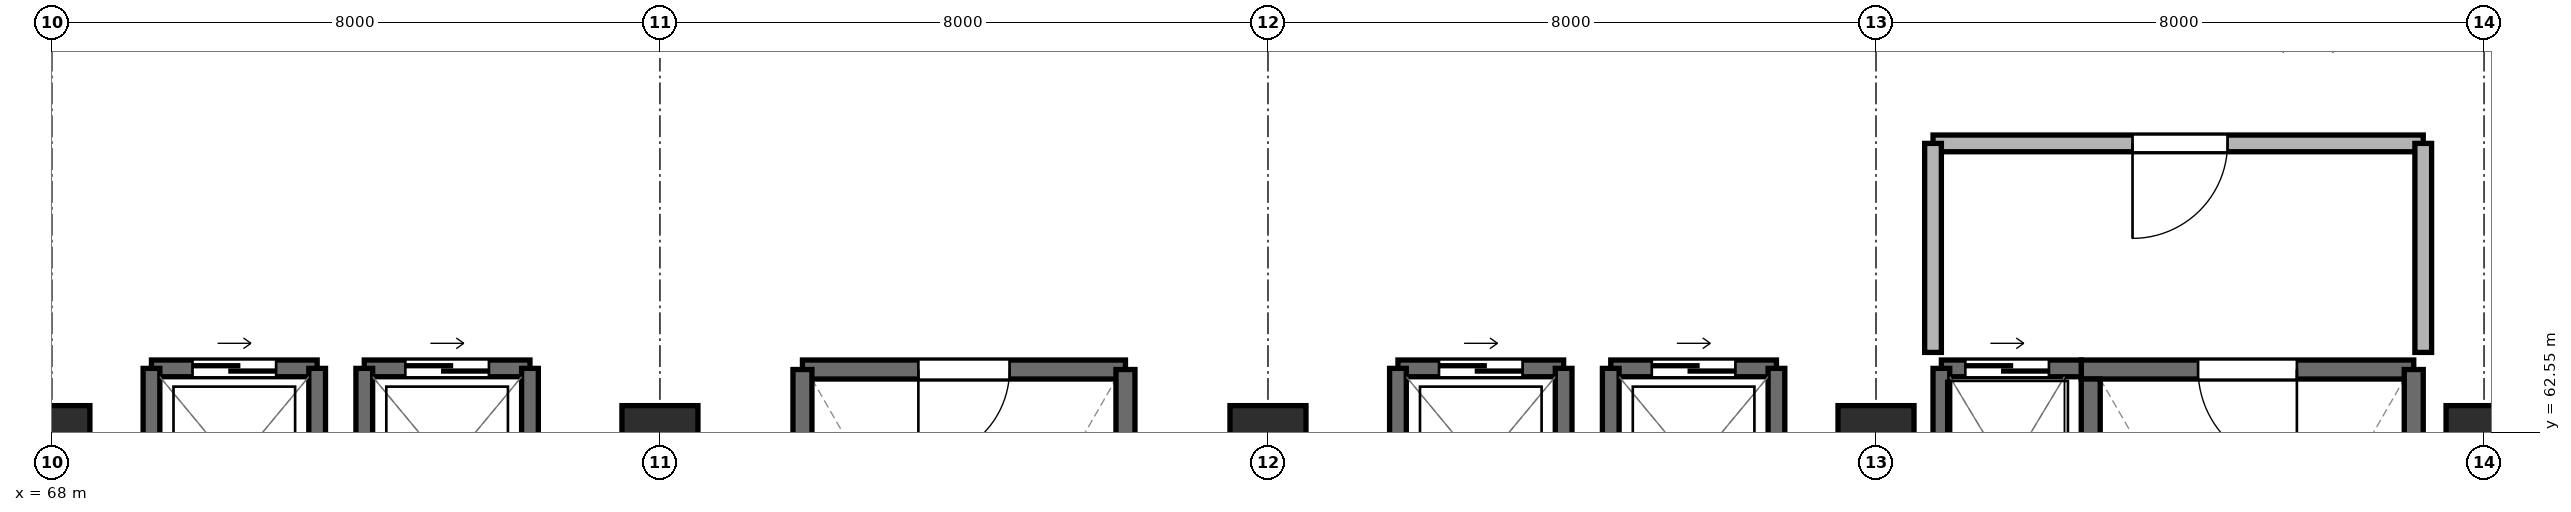
"""IFC4 building model, lengths in metres.
Left out: names, types, materials, properties, quantities, classifications, styles, units other than length and angle.
Written with IfcOpenShell. Run it as: python <this file> out.ifc"""

import sys

from ifc_helpers import new_model, si_unit, direction, frame, frame_2d, origin, origin_2d, place, context, subcontext, project, spatial, rectangle, extrude, element, fill, save


model = new_model("IFC4")
c1 = context("Model", 3, precision=1e-05, world=origin(), true_north=direction((0.0, 1.0)))
c2 = subcontext(c1, "Body", "Model", "MODEL_VIEW")
j1 = project(units=[si_unit("LENGTHUNIT", "METRE"), si_unit("PLANEANGLEUNIT", "RADIAN")], contexts=[c1])
p1 = place(None, origin())
s1 = spatial("IfcSite", under=j1, at=p1, CompositionType="ELEMENT")
p2 = place(p1, origin())
s2 = spatial("IfcBuilding", under=s1, at=p2, CompositionType="ELEMENT")
p3 = place(p2, frame((0.0, 0.0, 9.4)))
s3 = spatial("IfcBuildingStorey", under=s2, at=p3, CompositionType="ELEMENT", Elevation=9.4)
for number, where, z_axis, x_axis in (
    (1, (68.0, 62.4, -0.45), (0.0, 0.0, 1.0), (1.0, 0.0, 0.0)),
    (2, (76.0, 62.4, -0.45), (0.0, 0.0, 1.0), (1.0, 0.0, 0.0)),
    (3, (84.0, 62.4, -0.45), (0.0, 0.0, 1.0), (1.0, 0.0, 0.0)),
    (4, (92.0, 62.4, -0.45), (0.0, 0.0, 1.0), (1.0, 0.0, 0.0)),
    (5, (100.0, 62.4, -0.45), (0.0, 0.0, 1.0), (1.0, 0.0, 0.0)),
):
    element("IfcColumn", number, at=place(p3, frame(where, z_axis=z_axis, x_axis=x_axis)), inside=s3, PredefinedType="COLUMN", context=c2, shape_type="SweptSolid", body=[
        extrude(rectangle(XDim=1.0, YDim=1.0, at=origin_2d()), origin(), (0.0, 0.0, 1.0), 4.77),
    ])
p4 = place(p3, frame((99.075, 63.375, 0.0), z_axis=(0.0, 0.0, 1.0), x_axis=(-1.0, 0.0, 0.0)))
e6 = element("IfcWall", 6, at=p4, inside=s3, PredefinedType="SHEAR", context=c2, shape_type="SweptSolid", body=[
    extrude(rectangle(XDim=4.375, YDim=0.25, at=frame_2d((2.188, 0.0))), origin(), (0.0, 0.0, 1.0), 4.32),
])
p5 = place(p4, frame((1.538, 0.0, 0.0)))
e7 = element("IfcOpeningElement", 7, at=p5, cuts=e6, PredefinedType="OPENING", context=c2, shape_type="SweptSolid", body=[
    extrude(rectangle(XDim=1.3, YDim=2.2, at=frame_2d((0.65, 1.1))), frame((0.0, 0.137, 0.0), z_axis=(0.0, -1.0, 0.0), x_axis=(1.0, 0.0, 0.0)), (0.0, 0.0, 1.0), 0.274),
])
p6 = place(p3, frame((94.825, 63.25, 0.0), z_axis=(0.0, 0.0, 1.0), x_axis=(0.0, -1.0, 0.0)))
e8 = element("IfcWall", 8, at=p6, inside=s3, PredefinedType="SHEAR", context=c2, shape_type="SweptSolid", body=[
    extrude(rectangle(XDim=7.075, YDim=0.25, at=frame_2d((3.538, 0.0))), origin(), (0.0, 0.0, 1.0), 4.32),
])
p7 = place(p3, frame((99.075, 56.175, 0.0), z_axis=(0.0, 0.0, 1.0), x_axis=(0.0, 1.0, 0.0)))
e9 = element("IfcWall", 9, at=p7, inside=s3, PredefinedType="SHEAR", context=c2, shape_type="SweptSolid", body=[
    extrude(rectangle(XDim=7.2, YDim=0.25, at=frame_2d((3.6, 0.0))), origin(), (0.0, 0.0, 1.0), 4.32),
])
p8 = place(p3, frame((82.125, 63.375, 0.0), z_axis=(0.0, 0.0, 1.0), x_axis=(-1.0, 0.0, 0.0)))
e10 = element("IfcWall", 10, at=p8, inside=s3, PredefinedType="SHEAR", context=c2, shape_type="SweptSolid", body=[
    extrude(rectangle(XDim=4.25, YDim=0.25, at=frame_2d((2.125, 0.0))), origin(), (0.0, 0.0, 1.0), 4.32),
])
p9 = place(p8, frame((1.525, 0.0, 0.0)))
e11 = element("IfcOpeningElement", 11, at=p9, cuts=e10, PredefinedType="OPENING", context=c2, shape_type="SweptSolid", body=[
    extrude(rectangle(XDim=1.2, YDim=2.2, at=frame_2d((0.6, 1.1))), frame((0.0, 0.137, 0.0), z_axis=(0.0, -1.0, 0.0), x_axis=(1.0, 0.0, 0.0)), (0.0, 0.0, 1.0), 0.274),
])
for number, where, z_axis, x_axis in (
    (12, (77.875, 63.375, 0.0), (0.0, 0.0, 1.0), (0.0, -1.0, 0.0)),
    (13, (82.125, 56.175, 0.0), (0.0, 0.0, 1.0), (0.0, 1.0, 0.0)),
):
    element("IfcWall", number, at=place(p3, frame(where, z_axis=z_axis, x_axis=x_axis)), inside=s3, PredefinedType="SHEAR", context=c2, shape_type="SweptSolid", body=[
        extrude(rectangle(XDim=7.2, YDim=0.25, at=frame_2d((3.6, 0.0))), origin(), (0.0, 0.0, 1.0), 4.32),
    ])
p10 = place(p3, frame((94.7, 63.39, 0.0), z_axis=(0.0, 0.0, 1.0), x_axis=(-1.0, 0.0, 0.0)))
e14 = element("IfcWall", 14, at=p10, inside=s3, PredefinedType="SHEAR", context=c2, shape_type="SweptSolid", body=[
    extrude(rectangle(XDim=1.84, YDim=0.22, at=frame_2d((0.92, 0.0))), origin(), (0.0, 0.0, 1.0), 4.32),
])
p11 = place(p10, frame((0.425, 0.0, 0.0)))
e15 = element("IfcOpeningElement", 15, at=p11, cuts=e14, PredefinedType="OPENING", context=c2, shape_type="SweptSolid", body=[
    extrude(rectangle(XDim=1.1, YDim=2.2, at=frame_2d((0.55, 1.1))), frame((0.0, 0.122, 0.0), z_axis=(0.0, -1.0, 0.0), x_axis=(1.0, 0.0, 0.0)), (0.0, 0.0, 1.0), 0.244),
])
p12 = place(p3, frame((92.86, 63.39, 0.0), z_axis=(0.0, 0.0, 1.0), x_axis=(0.0, -1.0, 0.0)))
e16 = element("IfcWall", 16, at=p12, inside=s3, PredefinedType="SHEAR", context=c2, shape_type="SweptSolid", body=[
    extrude(rectangle(XDim=2.73, YDim=0.22, at=frame_2d((1.365, 0.0))), origin(), (0.0, 0.0, 1.0), 4.32),
])
p13 = place(p3, frame((71.49, 63.39, 0.0), z_axis=(0.0, 0.0, 1.0), x_axis=(-1.0, 0.0, 0.0)))
e17 = element("IfcWall", 17, at=p13, inside=s3, PredefinedType="SHEAR", context=c2, shape_type="SweptSolid", body=[
    extrude(rectangle(XDim=2.18, YDim=0.22, at=frame_2d((1.09, 0.0))), origin(), (0.0, 0.0, 1.0), 4.32),
])
p14 = place(p13, frame((0.54, 0.0, 0.0)))
e18 = element("IfcOpeningElement", 18, at=p14, cuts=e17, PredefinedType="OPENING", context=c2, shape_type="SweptSolid", body=[
    extrude(rectangle(XDim=1.1, YDim=2.2, at=frame_2d((0.55, 1.1))), frame((0.0, 0.122, 0.0), z_axis=(0.0, -1.0, 0.0), x_axis=(1.0, 0.0, 0.0)), (0.0, 0.0, 1.0), 0.244),
])
for number, where, z_axis, x_axis in (
    (19, (69.31, 63.39, 0.0), (0.0, 0.0, 1.0), (0.0, -1.0, 0.0)),
    (20, (71.49, 60.81, 0.0), (0.0, 0.0, 1.0), (0.0, 1.0, 0.0)),
):
    element("IfcWall", number, at=place(p3, frame(where, z_axis=z_axis, x_axis=x_axis)), inside=s3, PredefinedType="SHEAR", context=c2, shape_type="SweptSolid", body=[
        extrude(rectangle(XDim=2.58, YDim=0.22, at=frame_2d((1.29, 0.0))), origin(), (0.0, 0.0, 1.0), 4.32),
    ])
p15 = place(p3, frame((74.29, 63.39, 0.0), z_axis=(0.0, 0.0, 1.0), x_axis=(-1.0, 0.0, 0.0)))
e21 = element("IfcWall", 21, at=p15, inside=s3, PredefinedType="SHEAR", context=c2, shape_type="SweptSolid", body=[
    extrude(rectangle(XDim=2.18, YDim=0.22, at=frame_2d((1.09, 0.0))), origin(), (0.0, 0.0, 1.0), 4.32),
])
p16 = place(p15, frame((0.54, 0.0, 0.0)))
e22 = element("IfcOpeningElement", 22, at=p16, cuts=e21, PredefinedType="OPENING", context=c2, shape_type="SweptSolid", body=[
    extrude(rectangle(XDim=1.1, YDim=2.2, at=frame_2d((0.55, 1.1))), frame((0.0, 0.122, 0.0), z_axis=(0.0, -1.0, 0.0), x_axis=(1.0, 0.0, 0.0)), (0.0, 0.0, 1.0), 0.244),
])
for number, where, z_axis, x_axis in (
    (23, (72.11, 63.39, 0.0), (0.0, 0.0, 1.0), (0.0, -1.0, 0.0)),
    (24, (74.29, 60.81, 0.0), (0.0, 0.0, 1.0), (0.0, 1.0, 0.0)),
):
    element("IfcWall", number, at=place(p3, frame(where, z_axis=z_axis, x_axis=x_axis)), inside=s3, PredefinedType="SHEAR", context=c2, shape_type="SweptSolid", body=[
        extrude(rectangle(XDim=2.58, YDim=0.22, at=frame_2d((1.29, 0.0))), origin(), (0.0, 0.0, 1.0), 4.32),
    ])
p17 = place(p3, frame((87.89, 63.39, 0.0), z_axis=(0.0, 0.0, 1.0), x_axis=(-1.0, 0.0, 0.0)))
e25 = element("IfcWall", 25, at=p17, inside=s3, PredefinedType="SHEAR", context=c2, shape_type="SweptSolid", body=[
    extrude(rectangle(XDim=2.18, YDim=0.22, at=frame_2d((1.09, 0.0))), origin(), (0.0, 0.0, 1.0), 4.32),
])
p18 = place(p17, frame((0.54, 0.0, 0.0)))
e26 = element("IfcOpeningElement", 26, at=p18, cuts=e25, PredefinedType="OPENING", context=c2, shape_type="SweptSolid", body=[
    extrude(rectangle(XDim=1.1, YDim=2.2, at=frame_2d((0.55, 1.1))), frame((0.0, 0.122, 0.0), z_axis=(0.0, -1.0, 0.0), x_axis=(1.0, 0.0, 0.0)), (0.0, 0.0, 1.0), 0.244),
])
for number, where, z_axis, x_axis in (
    (27, (85.71, 63.39, 0.0), (0.0, 0.0, 1.0), (0.0, -1.0, 0.0)),
    (28, (87.89, 60.81, 0.0), (0.0, 0.0, 1.0), (0.0, 1.0, 0.0)),
):
    element("IfcWall", number, at=place(p3, frame(where, z_axis=z_axis, x_axis=x_axis)), inside=s3, PredefinedType="SHEAR", context=c2, shape_type="SweptSolid", body=[
        extrude(rectangle(XDim=2.58, YDim=0.22, at=frame_2d((1.29, 0.0))), origin(), (0.0, 0.0, 1.0), 4.32),
    ])
p19 = place(p3, frame((90.69, 63.39, 0.0), z_axis=(0.0, 0.0, 1.0), x_axis=(-1.0, 0.0, 0.0)))
e29 = element("IfcWall", 29, at=p19, inside=s3, PredefinedType="SHEAR", context=c2, shape_type="SweptSolid", body=[
    extrude(rectangle(XDim=2.18, YDim=0.22, at=frame_2d((1.09, 0.0))), origin(), (0.0, 0.0, 1.0), 4.32),
])
p20 = place(p19, frame((0.54, 0.0, 0.0)))
e30 = element("IfcOpeningElement", 30, at=p20, cuts=e29, PredefinedType="OPENING", context=c2, shape_type="SweptSolid", body=[
    extrude(rectangle(XDim=1.1, YDim=2.2, at=frame_2d((0.55, 1.1))), frame((0.0, 0.122, 0.0), z_axis=(0.0, -1.0, 0.0), x_axis=(1.0, 0.0, 0.0)), (0.0, 0.0, 1.0), 0.244),
])
for number, where, z_axis, x_axis in (
    (31, (88.51, 63.39, 0.0), (0.0, 0.0, 1.0), (0.0, -1.0, 0.0)),
    (32, (90.69, 60.81, 0.0), (0.0, 0.0, 1.0), (0.0, 1.0, 0.0)),
):
    element("IfcWall", number, at=place(p3, frame(where, z_axis=z_axis, x_axis=x_axis)), inside=s3, PredefinedType="SHEAR", context=c2, shape_type="SweptSolid", body=[
        extrude(rectangle(XDim=2.58, YDim=0.22, at=frame_2d((1.29, 0.0))), origin(), (0.0, 0.0, 1.0), 4.32),
    ])
p21 = place(p3, frame((92.75, 66.35, 0.0), z_axis=(0.0, 0.0, 1.0), x_axis=(1.0, 0.0, 0.0)))
e33 = element("IfcWall", 33, at=p21, inside=s3, PredefinedType="PARTITIONING", context=c2, shape_type="SweptSolid", body=[
    extrude(rectangle(XDim=6.45, YDim=0.22, at=frame_2d((3.225, 0.0))), origin(), (0.0, 0.0, 1.0), 3.88),
])
p22 = place(p21, frame((2.625, 0.0, 0.0)))
e34 = element("IfcOpeningElement", 34, at=p22, cuts=e33, PredefinedType="OPENING", context=c2, shape_type="SweptSolid", body=[
    extrude(rectangle(XDim=1.25, YDim=2.2, at=frame_2d((0.625, 1.1))), frame((0.0, 0.122, 0.0), z_axis=(0.0, -1.0, 0.0), x_axis=(1.0, 0.0, 0.0)), (0.0, 0.0, 1.0), 0.244),
])
for number, where, z_axis, x_axis in (
    (35, (92.75, 63.6, 0.0), (0.0, 0.0, 1.0), (0.0, 1.0, 0.0)),
    (36, (99.2, 63.6, 0.0), (0.0, 0.0, 1.0), (0.0, 1.0, 0.0)),
):
    element("IfcWall", number, at=place(p3, frame(where, z_axis=z_axis, x_axis=x_axis)), inside=s3, PredefinedType="PARTITIONING", context=c2, shape_type="SweptSolid", body=[
        extrude(rectangle(XDim=2.75, YDim=0.22, at=frame_2d((1.375, 0.0))), origin(), (0.0, 0.0, 1.0), 3.88),
    ])
p23 = place(p5, origin())
e37 = element("IfcDoor", 37, at=p23, inside=s3, OperationType="SINGLE_SWING_LEFT", PredefinedType="DOOR", context=c2, shape_type="SweptSolid", body=[
    extrude(rectangle(XDim=1.3, YDim=2.2, at=frame_2d((0.65, 1.1))), frame((0.0, 0.025, 0.0), z_axis=(0.0, -1.0, 0.0), x_axis=(1.0, 0.0, 0.0)), (0.0, 0.0, 1.0), 0.05),
])
fill(e7, e37)
p24 = place(p9, origin())
e38 = element("IfcDoor", 38, at=p24, inside=s3, OperationType="SINGLE_SWING_RIGHT", PredefinedType="DOOR", context=c2, shape_type="SweptSolid", body=[
    extrude(rectangle(XDim=1.2, YDim=2.2, at=frame_2d((0.6, 1.1))), frame((0.0, 0.025, 0.0), z_axis=(0.0, -1.0, 0.0), x_axis=(1.0, 0.0, 0.0)), (0.0, 0.0, 1.0), 0.05),
])
fill(e11, e38)
p25 = place(p11, origin())
e39 = element("IfcDoor", 39, at=p25, inside=s3, OperationType="SLIDING_TO_LEFT", PredefinedType="DOOR", context=c2, shape_type="SweptSolid", body=[
    extrude(rectangle(XDim=1.1, YDim=2.2, at=frame_2d((0.55, 1.1))), frame((0.0, 0.025, 0.0), z_axis=(0.0, -1.0, 0.0), x_axis=(1.0, 0.0, 0.0)), (0.0, 0.0, 1.0), 0.05),
])
fill(e15, e39)
p26 = place(p14, origin())
e40 = element("IfcDoor", 40, at=p26, inside=s3, OperationType="SLIDING_TO_LEFT", PredefinedType="DOOR", context=c2, shape_type="SweptSolid", body=[
    extrude(rectangle(XDim=1.1, YDim=2.2, at=frame_2d((0.55, 1.1))), frame((0.0, 0.025, 0.0), z_axis=(0.0, -1.0, 0.0), x_axis=(1.0, 0.0, 0.0)), (0.0, 0.0, 1.0), 0.05),
])
fill(e18, e40)
p27 = place(p16, origin())
e41 = element("IfcDoor", 41, at=p27, inside=s3, OperationType="SLIDING_TO_LEFT", PredefinedType="DOOR", context=c2, shape_type="SweptSolid", body=[
    extrude(rectangle(XDim=1.1, YDim=2.2, at=frame_2d((0.55, 1.1))), frame((0.0, 0.025, 0.0), z_axis=(0.0, -1.0, 0.0), x_axis=(1.0, 0.0, 0.0)), (0.0, 0.0, 1.0), 0.05),
])
fill(e22, e41)
p28 = place(p18, origin())
e42 = element("IfcDoor", 42, at=p28, inside=s3, OperationType="SLIDING_TO_LEFT", PredefinedType="DOOR", context=c2, shape_type="SweptSolid", body=[
    extrude(rectangle(XDim=1.1, YDim=2.2, at=frame_2d((0.55, 1.1))), frame((0.0, 0.025, 0.0), z_axis=(0.0, -1.0, 0.0), x_axis=(1.0, 0.0, 0.0)), (0.0, 0.0, 1.0), 0.05),
])
fill(e26, e42)
p29 = place(p20, origin())
e43 = element("IfcDoor", 43, at=p29, inside=s3, OperationType="SLIDING_TO_LEFT", PredefinedType="DOOR", context=c2, shape_type="SweptSolid", body=[
    extrude(rectangle(XDim=1.1, YDim=2.2, at=frame_2d((0.55, 1.1))), frame((0.0, 0.025, 0.0), z_axis=(0.0, -1.0, 0.0), x_axis=(1.0, 0.0, 0.0)), (0.0, 0.0, 1.0), 0.05),
])
fill(e30, e43)
p30 = place(p22, frame((1.25, 0.0, 0.0), z_axis=(0.0, 0.0, 1.0), x_axis=(-1.0, 0.0, 0.0)))
e44 = element("IfcDoor", 44, at=p30, inside=s3, OperationType="SINGLE_SWING_LEFT", PredefinedType="DOOR", context=c2, shape_type="SweptSolid", body=[
    extrude(rectangle(XDim=1.25, YDim=2.2, at=frame_2d((0.625, 1.1))), frame((0.0, 0.025, 0.0), z_axis=(0.0, -1.0, 0.0), x_axis=(1.0, 0.0, 0.0)), (0.0, 0.0, 1.0), 0.05),
])
fill(e34, e44)
save(model, sys.argv[1])
